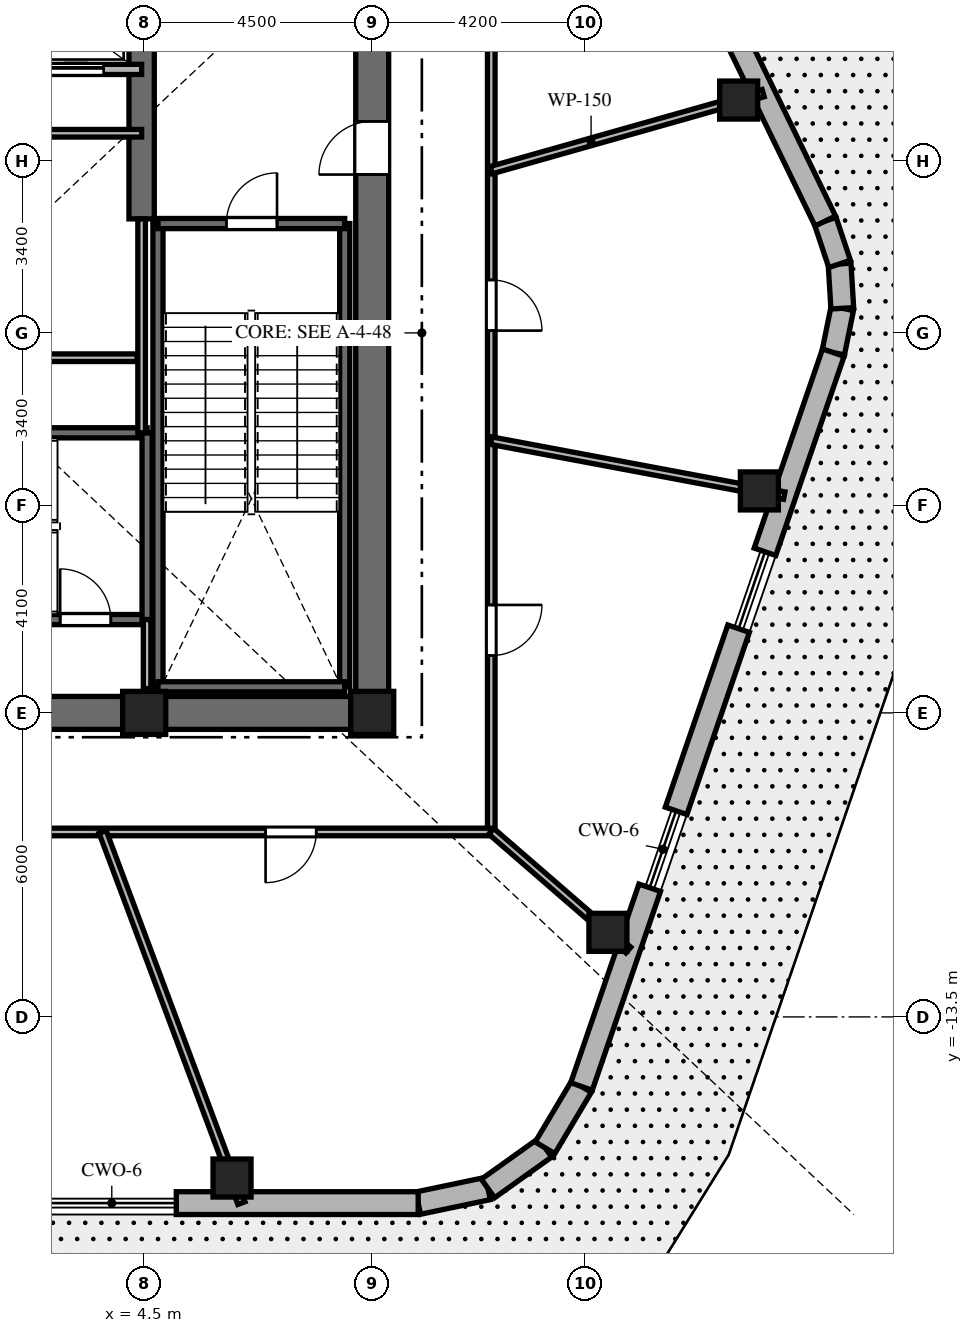
"""IFC4 building model, lengths in metres.
Left out: names, types, materials, properties, quantities, classifications, styles, units other than length and angle.
Written with IfcOpenShell. Run it as: python <this file> out.ifc"""

import sys

from ifc_helpers import new_model, si_unit, direction, frame, frame_2d, origin, origin_2d, place, context, subcontext, project, spatial, rectangle, extrude, element, fill, save


model = new_model("IFC4")
c1 = context("Model", 3, precision=1e-05, world=origin(), true_north=direction((0.0, 1.0)))
c2 = subcontext(c1, "Body", "Model", "MODEL_VIEW")
j1 = project(units=[si_unit("LENGTHUNIT", "METRE"), si_unit("PLANEANGLEUNIT", "RADIAN")], contexts=[c1])
p1 = place(None, origin())
s1 = spatial("IfcSite", under=j1, at=p1, CompositionType="ELEMENT")
p2 = place(p1, origin())
s2 = spatial("IfcBuilding", under=s1, at=p2, CompositionType="ELEMENT")
p3 = place(p2, frame((0.0, 0.0, 305.4)))
s3 = spatial("IfcBuildingStorey", under=s2, at=p3, CompositionType="ELEMENT", Elevation=305.4)
p4 = place(p3, frame((-9.325, -7.5, 0.0), z_axis=(0.0, 0.0, 1.0), x_axis=(1.0, 0.0, 0.0)))
e1 = element("IfcWall", 1, at=p4, inside=s3, PredefinedType="SHEAR", context=c2, shape_type="SweptSolid", body=[
    extrude(rectangle(XDim=18.65, YDim=0.65, at=frame_2d((9.325, 0.0))), origin(), (0.0, 0.0, 1.0), 5.0),
])
p5 = place(p4, frame((9.375, 0.0, 0.0)))
e2 = element("IfcOpeningElement", 2, at=p5, cuts=e1, PredefinedType="OPENING", context=c2, shape_type="SweptSolid", body=[
    extrude(rectangle(XDim=1.0, YDim=2.15, at=frame_2d((0.5, 1.075))), frame((0.0, 0.335, 0.0), z_axis=(0.0, -1.0, 0.0), x_axis=(1.0, 0.0, 0.0)), (0.0, 0.0, 1.0), 0.67),
])
p6 = place(p3, frame((9.0, -7.175, 0.0), z_axis=(0.0, 0.0, 1.0), x_axis=(0.0, 1.0, 0.0)))
e3 = element("IfcWall", 3, at=p6, inside=s3, PredefinedType="SHEAR", context=c2, shape_type="SweptSolid", body=[
    extrude(rectangle(XDim=14.35, YDim=0.65, at=frame_2d((7.175, 0.0))), origin(), (0.0, 0.0, 1.0), 5.0),
])
p7 = place(p6, frame((10.3, 0.0, 0.0)))
e4 = element("IfcOpeningElement", 4, at=p7, cuts=e3, PredefinedType="OPENING", context=c2, shape_type="SweptSolid", body=[
    extrude(rectangle(XDim=1.05, YDim=2.15, at=frame_2d((0.525, 1.075))), frame((0.0, 0.335, 0.0), z_axis=(0.0, -1.0, 0.0), x_axis=(1.0, 0.0, 0.0)), (0.0, 0.0, 1.0), 0.67),
])
p8 = place(p3, frame((4.45, 2.25, 0.0), z_axis=(0.0, 0.0, 1.0), x_axis=(0.0, 1.0, 0.0)))
e5 = element("IfcWall", 5, at=p8, inside=s3, PredefinedType="SHEAR", context=c2, shape_type="SweptSolid", body=[
    extrude(rectangle(XDim=4.925, YDim=0.5, at=frame_2d((2.462, 0.0))), origin(), (0.0, 0.0, 1.0), 5.0),
])
for number, where, z_axis, x_axis in (
    (6, (4.772, -6.985, 0.0), (0.0, 0.0, 1.0), (0.0, 1.0, 0.0)),
    (7, (8.458, -6.985, 0.0), (0.0, 0.0, 1.0), (0.0, 1.0, 0.0)),
):
    element("IfcWall", number, at=place(p3, frame(where, z_axis=z_axis, x_axis=x_axis)), inside=s3, PredefinedType="SHEAR", context=c2, shape_type="SweptSolid", body=[
        extrude(rectangle(XDim=9.143, YDim=0.2, at=frame_2d((4.572, 0.0))), origin(), (0.0, 0.0, 1.0), 5.0),
    ])
p9 = place(p3, frame((4.772, -6.985, 0.0), z_axis=(0.0, 0.0, 1.0), x_axis=(1.0, 0.0, 0.0)))
e8 = element("IfcWall", 8, at=p9, inside=s3, PredefinedType="SHEAR", context=c2, shape_type="SweptSolid", body=[
    extrude(rectangle(XDim=3.686, YDim=0.2, at=frame_2d((1.843, 0.0))), origin(), (0.0, 0.0, 1.0), 5.0),
])
p10 = place(p3, frame((4.772, 2.158, 0.0), z_axis=(0.0, 0.0, 1.0), x_axis=(1.0, 0.0, 0.0)))
e9 = element("IfcWall", 9, at=p10, inside=s3, PredefinedType="SHEAR", context=c2, shape_type="SweptSolid", body=[
    extrude(rectangle(XDim=3.686, YDim=0.2, at=frame_2d((1.843, 0.0))), origin(), (0.0, 0.0, 1.0), 5.0),
])
p11 = place(p10, frame((1.35, 0.0, 0.0)))
e10 = element("IfcOpeningElement", 10, at=p11, cuts=e9, PredefinedType="OPENING", context=c2, shape_type="SweptSolid", body=[
    extrude(rectangle(XDim=1.0, YDim=2.15, at=frame_2d((0.5, 1.075))), frame((0.0, 0.11, 0.0), z_axis=(0.0, -1.0, 0.0), x_axis=(1.0, 0.0, 0.0)), (0.0, 0.0, 1.0), 0.22),
])
p12 = place(p3, frame((-4.608, -5.658, 0.0), z_axis=(0.0, 0.0, 1.0), x_axis=(1.0, 0.0, 0.0)))
e11 = element("IfcWall", 11, at=p12, inside=s3, PredefinedType="SHEAR", context=c2, shape_type="SweptSolid", body=[
    extrude(rectangle(XDim=9.166, YDim=0.2, at=frame_2d((4.583, 0.0))), origin(), (0.0, 0.0, 1.0), 5.0),
])
p13 = place(p12, frame((7.45, 0.0, 0.0)))
e12 = element("IfcOpeningElement", 12, at=p13, cuts=e11, PredefinedType="OPENING", context=c2, shape_type="SweptSolid", body=[
    extrude(rectangle(XDim=1.0, YDim=2.15, at=frame_2d((0.5, 1.075))), frame((0.0, 0.11, 0.0), z_axis=(0.0, -1.0, 0.0), x_axis=(1.0, 0.0, 0.0)), (0.0, 0.0, 1.0), 0.22),
])
p14 = place(p3, frame((-4.608, -1.972, 0.0), z_axis=(0.0, 0.0, 1.0), x_axis=(1.0, 0.0, 0.0)))
e13 = element("IfcWall", 13, at=p14, inside=s3, PredefinedType="SHEAR", context=c2, shape_type="SweptSolid", body=[
    extrude(rectangle(XDim=9.166, YDim=0.2, at=frame_2d((4.583, 0.0))), origin(), (0.0, 0.0, 1.0), 5.0),
])
p15 = place(p3, frame((4.558, -5.658, 0.0), z_axis=(0.0, 0.0, 1.0), x_axis=(0.0, 1.0, 0.0)))
e14 = element("IfcWall", 14, at=p15, inside=s3, PredefinedType="SHEAR", context=c2, shape_type="SweptSolid", body=[
    extrude(rectangle(XDim=3.686, YDim=0.2, at=frame_2d((1.843, 0.0))), origin(), (0.0, 0.0, 1.0), 5.0),
])
for number, where, z_axis, x_axis in (
    (15, (4.5, -7.5, 0.0), (0.0, 0.0, 1.0), (1.0, 0.0, 0.0)),
    (16, (9.0, -7.5, 0.0), (0.0, 0.0, 1.0), (1.0, 0.0, 0.0)),
):
    element("IfcColumn", number, at=place(p3, frame(where, z_axis=z_axis, x_axis=x_axis)), inside=s3, PredefinedType="COLUMN", context=c2, shape_type="SweptSolid", body=[
        extrude(rectangle(XDim=0.85, YDim=0.85, at=origin_2d()), origin(), (0.0, 0.0, 1.0), 5.0),
    ])
for number, where, z_axis, x_axis in (
    (17, (6.234, -16.68, 0.0), (0.0, 0.0, 1.0), (1.0, 0.0, 0.0)),
    (18, (13.652, -11.831, 0.0), (0.0, 0.0, 1.0), (1.0, 0.0, 0.0)),
    (19, (16.641, -3.119, 0.0), (0.0, 0.0, 1.0), (1.0, 0.0, 0.0)),
    (20, (16.232, 4.595, 0.0), (0.0, 0.0, 1.0), (1.0, 0.0, 0.0)),
):
    element("IfcColumn", number, at=place(p3, frame(where, z_axis=z_axis, x_axis=x_axis)), inside=s3, PredefinedType="COLUMN", context=c2, shape_type="SweptSolid", body=[
        extrude(rectangle(XDim=0.75, YDim=0.75, at=origin_2d()), origin(), (0.0, 0.0, 1.0), 5.0),
    ])
p16 = place(p3, frame((9.908, -17.175, 0.0), z_axis=(0.0, 0.0, 1.0), x_axis=(0.978709642506, 0.205249691027, 0.0)))
e21 = element("IfcWall", 21, at=p16, inside=s3, PredefinedType="SOLIDWALL", context=c2, shape_type="SweptSolid", body=[
    extrude(rectangle(XDim=1.407, YDim=0.45, at=frame_2d((0.704, 0.0))), origin(), (0.0, 0.0, 1.0), 4.68),
])
p17 = place(p3, frame((11.285, -16.886, 0.0), z_axis=(0.0, 0.0, 1.0), x_axis=(0.813840765051, 0.581087953017, 0.0)))
e22 = element("IfcWall", 22, at=p17, inside=s3, PredefinedType="SOLIDWALL", context=c2, shape_type="SweptSolid", body=[
    extrude(rectangle(XDim=1.384, YDim=0.45, at=frame_2d((0.692, 0.0))), origin(), (0.0, 0.0, 1.0), 4.68),
])
p18 = place(p3, frame((12.411, -16.082, 0.0), z_axis=(0.0, 0.0, 1.0), x_axis=(0.511788829014, 0.859111281789, 0.0)))
e23 = element("IfcWall", 23, at=p18, inside=s3, PredefinedType="SOLIDWALL", context=c2, shape_type="SweptSolid", body=[
    extrude(rectangle(XDim=1.407, YDim=0.45, at=frame_2d((0.704, 0.0))), origin(), (0.0, 0.0, 1.0), 4.68),
])
p19 = place(p3, frame((18.1, -0.389, 0.0), z_axis=(0.0, 0.0, 1.0), x_axis=(0.198587865476, 0.980083088154, 0.0)))
e24 = element("IfcWall", 24, at=p19, inside=s3, PredefinedType="SOLIDWALL", context=c2, shape_type="SweptSolid", body=[
    extrude(rectangle(XDim=0.893, YDim=0.45, at=frame_2d((0.446, 0.0))), origin(), (0.0, 0.0, 1.0), 4.68),
])
p20 = place(p3, frame((18.278, 0.486, 0.0), z_axis=(0.0, 0.0, 1.0), x_axis=(-0.060923410031, 0.998142443798, 0.0)))
e25 = element("IfcWall", 25, at=p20, inside=s3, PredefinedType="SOLIDWALL", context=c2, shape_type="SweptSolid", body=[
    extrude(rectangle(XDim=0.878, YDim=0.45, at=frame_2d((0.439, 0.0))), origin(), (0.0, 0.0, 1.0), 4.68),
])
p21 = place(p3, frame((18.224, 1.362, 0.0), z_axis=(0.0, 0.0, 1.0), x_axis=(-0.316227766017, 0.948683298051, 0.0)))
e26 = element("IfcWall", 26, at=p21, inside=s3, PredefinedType="SOLIDWALL", context=c2, shape_type="SweptSolid", body=[
    extrude(rectangle(XDim=0.893, YDim=0.45, at=frame_2d((0.446, 0.0))), origin(), (0.0, 0.0, 1.0), 4.68),
])
p22 = place(p3, frame((5.134, -17.175, 0.0), z_axis=(0.0, 0.0, 1.0), x_axis=(1.0, 0.0, 0.0)))
e27 = element("IfcWall", 27, at=p22, inside=s3, PredefinedType="SOLIDWALL", context=c2, shape_type="SweptSolid", body=[
    extrude(rectangle(XDim=4.773, YDim=0.45, at=frame_2d((2.387, 0.0))), origin(), (0.0, 0.0, 1.0), 4.68),
])
p23 = place(p3, frame((13.131, -14.873, 0.0), z_axis=(0.0, 0.0, 1.0), x_axis=(0.324498911717, 0.945886069405, 0.0)))
e28 = element("IfcWall", 28, at=p23, inside=s3, PredefinedType="SOLIDWALL", context=c2, shape_type="SweptSolid", body=[
    extrude(rectangle(XDim=4.147, YDim=0.45, at=frame_2d((2.073, 0.0))), origin(), (0.0, 0.0, 1.0), 4.68),
])
p24 = place(p3, frame((14.998, -9.433, 0.0), z_axis=(0.0, 0.0, 1.0), x_axis=(0.324503351443, 0.945884546286, 0.0)))
e29 = element("IfcWall", 29, at=p24, inside=s3, PredefinedType="SOLIDWALL", context=c2, shape_type="SweptSolid", body=[
    extrude(rectangle(XDim=3.8, YDim=0.45, at=frame_2d((1.9, 0.0))), origin(), (0.0, 0.0, 1.0), 4.68),
])
p25 = place(p3, frame((16.752, -4.32, 0.0), z_axis=(0.0, 0.0, 1.0), x_axis=(0.324516563827, 0.945880013428, 0.0)))
e30 = element("IfcWall", 30, at=p25, inside=s3, PredefinedType="SOLIDWALL", context=c2, shape_type="SweptSolid", body=[
    extrude(rectangle(XDim=4.156, YDim=0.45, at=frame_2d((2.078, 0.0))), origin(), (0.0, 0.0, 1.0), 4.68),
])
p26 = place(p3, frame((17.942, 2.208, 0.0), z_axis=(0.0, 0.0, 1.0), x_axis=(-0.437062225544, 0.899431270861, 0.0)))
e31 = element("IfcWall", 31, at=p26, inside=s3, PredefinedType="SOLIDWALL", context=c2, shape_type="SweptSolid", body=[
    extrude(rectangle(XDim=3.994, YDim=0.45, at=frame_2d((1.997, 0.0))), origin(), (0.0, 0.0, 1.0), 4.68),
])
p27 = place(p3, frame((4.558, -7.02, 0.0), z_axis=(0.0, 0.0, 1.0), x_axis=(0.0, 1.0, 0.0)))
e32 = element("IfcWall", 32, at=p27, inside=s3, PredefinedType="PARTITIONING", context=c2, shape_type="SweptSolid", body=[
    extrude(rectangle(XDim=1.362, YDim=0.15, at=frame_2d((0.681, 0.0))), origin(), (0.0, 0.0, 1.0), 4.68),
])
p28 = place(p3, frame((1.85, 5.2, 0.0), z_axis=(0.0, 0.0, 1.0), x_axis=(1.0, 0.0, 0.0)))
e33 = element("IfcWall", 33, at=p28, inside=s3, PredefinedType="PARTITIONING", context=c2, shape_type="SweptSolid", body=[
    extrude(rectangle(XDim=2.6, YDim=0.2, at=frame_2d((1.3, 0.0))), origin(), (0.0, 0.0, 1.0), 4.68),
])
p29 = place(p28, frame((0.75, 0.0, 0.0)))
e34 = element("IfcOpeningElement", 34, at=p29, cuts=e33, PredefinedType="OPENING", context=c2, shape_type="SweptSolid", body=[
    extrude(rectangle(XDim=1.1, YDim=2.2, at=frame_2d((0.55, 1.1))), frame((0.0, 0.11, 0.0), z_axis=(0.0, -1.0, 0.0), x_axis=(1.0, 0.0, 0.0)), (0.0, 0.0, 1.0), 0.22),
])
p30 = place(p3, frame((4.45, -1.972, 0.0), z_axis=(0.0, 0.0, 1.0), x_axis=(0.0, 1.0, 0.0)))
e35 = element("IfcWall", 35, at=p30, inside=s3, PredefinedType="PARTITIONING", context=c2, shape_type="SweptSolid", body=[
    extrude(rectangle(XDim=4.222, YDim=0.15, at=frame_2d((2.111, 0.0))), origin(), (0.0, 0.0, 1.0), 4.68),
])
p31 = place(p3, frame((1.9, 3.94, 0.0), z_axis=(0.0, 0.0, 1.0), x_axis=(1.0, 0.0, 0.0)))
e36 = element("IfcWall", 36, at=p31, inside=s3, PredefinedType="PARTITIONING", context=c2, shape_type="SweptSolid", body=[
    extrude(rectangle(XDim=2.55, YDim=0.15, at=frame_2d((1.275, 0.0))), origin(), (0.0, 0.0, 1.0), 4.68),
])
p32 = place(p3, frame((-4.36, -0.49, 0.0), z_axis=(0.0, 0.0, 1.0), x_axis=(1.0, 0.0, 0.0)))
e37 = element("IfcWall", 37, at=p32, inside=s3, PredefinedType="PARTITIONING", context=c2, shape_type="SweptSolid", body=[
    extrude(rectangle(XDim=8.72, YDim=0.15, at=frame_2d((4.36, 0.0))), origin(), (0.0, 0.0, 1.0), 4.68),
])
p33 = place(p32, frame((2.81, 0.0, 0.0)))
e38 = element("IfcOpeningElement", 38, at=p33, cuts=e37, PredefinedType="OPENING", context=c2, shape_type="SweptSolid", body=[
    extrude(rectangle(XDim=0.85, YDim=2.03, at=frame_2d((0.425, 1.015))), frame((0.0, 0.085, 0.0), z_axis=(0.0, -1.0, 0.0), x_axis=(1.0, 0.0, 0.0)), (0.0, 0.0, 1.0), 0.17),
])
p34 = place(p32, frame((4.61, 0.0, 0.0)))
e39 = element("IfcOpeningElement", 39, at=p34, cuts=e37, PredefinedType="OPENING", context=c2, shape_type="SweptSolid", body=[
    extrude(rectangle(XDim=0.85, YDim=2.03, at=frame_2d((0.425, 1.015))), frame((0.0, 0.085, 0.0), z_axis=(0.0, -1.0, 0.0), x_axis=(1.0, 0.0, 0.0)), (0.0, 0.0, 1.0), 0.17),
])
p35 = place(p3, frame((11.35, 9.85, 0.0), z_axis=(0.0, 0.0, 1.0), x_axis=(0.0, -1.0, 0.0)))
e40 = element("IfcWall", 40, at=p35, inside=s3, PredefinedType="PARTITIONING", context=c2, shape_type="SweptSolid", body=[
    extrude(rectangle(XDim=19.7, YDim=0.15, at=frame_2d((9.85, 0.0))), origin(), (0.0, 0.0, 1.0), 2.87),
])
p36 = place(p35, frame((2.938, 0.0, 0.0)))
e41 = element("IfcOpeningElement", 41, at=p36, cuts=e40, PredefinedType="OPENING", context=c2, shape_type="SweptSolid", body=[
    extrude(rectangle(XDim=1.0, YDim=2.03, at=frame_2d((0.5, 1.015))), frame((0.0, 0.085, 0.0), z_axis=(0.0, -1.0, 0.0), x_axis=(1.0, 0.0, 0.0)), (0.0, 0.0, 1.0), 0.17),
])
p37 = place(p35, frame((15.219, 0.0, 0.0)))
e42 = element("IfcOpeningElement", 42, at=p37, cuts=e40, PredefinedType="OPENING", context=c2, shape_type="SweptSolid", body=[
    extrude(rectangle(XDim=1.0, YDim=2.03, at=frame_2d((0.5, 1.015))), frame((0.0, 0.085, 0.0), z_axis=(0.0, -1.0, 0.0), x_axis=(1.0, 0.0, 0.0)), (0.0, 0.0, 1.0), 0.17),
])
p38 = place(p35, frame((8.805, 0.0, 0.0)))
e43 = element("IfcOpeningElement", 43, at=p38, cuts=e40, PredefinedType="OPENING", context=c2, shape_type="SweptSolid", body=[
    extrude(rectangle(XDim=1.0, YDim=2.03, at=frame_2d((0.5, 1.015))), frame((0.0, 0.085, 0.0), z_axis=(0.0, -1.0, 0.0), x_axis=(1.0, 0.0, 0.0)), (0.0, 0.0, 1.0), 0.17),
])
p39 = place(p3, frame((11.35, -9.85, 0.0), z_axis=(0.0, 0.0, 1.0), x_axis=(-1.0, 0.0, 0.0)))
e44 = element("IfcWall", 44, at=p39, inside=s3, PredefinedType="PARTITIONING", context=c2, shape_type="SweptSolid", body=[
    extrude(rectangle(XDim=22.7, YDim=0.15, at=frame_2d((11.35, 0.0))), origin(), (0.0, 0.0, 1.0), 2.87),
])
p40 = place(p39, frame((17.249, 0.0, 0.0)))
e45 = element("IfcOpeningElement", 45, at=p40, cuts=e44, PredefinedType="OPENING", context=c2, shape_type="SweptSolid", body=[
    extrude(rectangle(XDim=1.0, YDim=2.03, at=frame_2d((0.5, 1.015))), frame((0.0, 0.085, 0.0), z_axis=(0.0, -1.0, 0.0), x_axis=(1.0, 0.0, 0.0)), (0.0, 0.0, 1.0), 0.17),
])
p41 = place(p39, frame((10.441, 0.0, 0.0)))
e46 = element("IfcOpeningElement", 46, at=p41, cuts=e44, PredefinedType="OPENING", context=c2, shape_type="SweptSolid", body=[
    extrude(rectangle(XDim=1.0, YDim=2.03, at=frame_2d((0.5, 1.015))), frame((0.0, 0.085, 0.0), z_axis=(0.0, -1.0, 0.0), x_axis=(1.0, 0.0, 0.0)), (0.0, 0.0, 1.0), 0.17),
])
p42 = place(p39, frame((3.454, 0.0, 0.0)))
e47 = element("IfcOpeningElement", 47, at=p42, cuts=e44, PredefinedType="OPENING", context=c2, shape_type="SweptSolid", body=[
    extrude(rectangle(XDim=1.0, YDim=2.03, at=frame_2d((0.5, 1.015))), frame((0.0, 0.085, 0.0), z_axis=(0.0, -1.0, 0.0), x_axis=(1.0, 0.0, 0.0)), (0.0, 0.0, 1.0), 0.17),
])
p43 = place(p3, frame((11.35, 3.213, 0.0), z_axis=(0.0, 0.0, 1.0), x_axis=(0.962182015747, 0.272407357782, 0.0)))
e48 = element("IfcWall", 48, at=p43, inside=s3, PredefinedType="PARTITIONING", context=c2, shape_type="SweptSolid", body=[
    extrude(rectangle(XDim=5.576, YDim=0.15, at=frame_2d((2.788, 0.0))), origin(), (0.0, 0.0, 1.0), 2.87),
])
p44 = place(p3, frame((3.681, -9.85, 0.0), z_axis=(0.0, 0.0, 1.0), x_axis=(0.350079676448, -0.936719926199, 0.0)))
e49 = element("IfcWall", 49, at=p44, inside=s3, PredefinedType="PARTITIONING", context=c2, shape_type="SweptSolid", body=[
    extrude(rectangle(XDim=7.82, YDim=0.15, at=frame_2d((3.91, 0.0))), origin(), (0.0, 0.0, 1.0), 2.87),
])
p45 = place(p3, frame((11.35, -9.836, 0.0), z_axis=(0.0, 0.0, 1.0), x_axis=(0.755716089778, -0.65489937521, 0.0)))
e50 = element("IfcWall", 50, at=p45, inside=s3, PredefinedType="PARTITIONING", context=c2, shape_type="SweptSolid", body=[
    extrude(rectangle(XDim=3.579, YDim=0.15, at=frame_2d((1.79, 0.0))), origin(), (0.0, 0.0, 1.0), 2.87),
])
p46 = place(p3, frame((11.35, -2.127, 0.0), z_axis=(0.0, 0.0, 1.0), x_axis=(0.982876415115, -0.184265983326, 0.0)))
e51 = element("IfcWall", 51, at=p46, inside=s3, PredefinedType="PARTITIONING", context=c2, shape_type="SweptSolid", body=[
    extrude(rectangle(XDim=5.883, YDim=0.15, at=frame_2d((2.941, 0.0))), origin(), (0.0, 0.0, 1.0), 2.87),
])
p47 = place(p11, origin())
e52 = element("IfcDoor", 52, at=p47, inside=s3, OperationType="SINGLE_SWING_RIGHT", PredefinedType="DOOR", context=c2, shape_type="SweptSolid", body=[
    extrude(rectangle(XDim=1.0, YDim=2.15, at=frame_2d((0.5, 1.075))), frame((0.0, 0.025, 0.0), z_axis=(0.0, -1.0, 0.0), x_axis=(1.0, 0.0, 0.0)), (0.0, 0.0, 1.0), 0.05),
])
fill(e10, e52)
p48 = place(p13, origin())
e53 = element("IfcDoor", 53, at=p48, inside=s3, OperationType="SINGLE_SWING_LEFT", PredefinedType="DOOR", context=c2, shape_type="SweptSolid", body=[
    extrude(rectangle(XDim=1.0, YDim=2.15, at=frame_2d((0.5, 1.075))), frame((0.0, 0.025, 0.0), z_axis=(0.0, -1.0, 0.0), x_axis=(1.0, 0.0, 0.0)), (0.0, 0.0, 1.0), 0.05),
])
fill(e12, e53)
p49 = place(p7, origin())
e54 = element("IfcDoor", 54, at=p49, inside=s3, OperationType="SINGLE_SWING_LEFT", PredefinedType="DOOR", context=c2, shape_type="SweptSolid", body=[
    extrude(rectangle(XDim=1.05, YDim=2.15, at=frame_2d((0.525, 1.075))), frame((0.0, 0.025, 0.0), z_axis=(0.0, -1.0, 0.0), x_axis=(1.0, 0.0, 0.0)), (0.0, 0.0, 1.0), 0.05),
])
fill(e4, e54)
p50 = place(p29, origin())
e55 = element("IfcDoor", 55, at=p50, inside=s3, OperationType="SLIDING_TO_RIGHT", PredefinedType="DOOR", context=c2, shape_type="SweptSolid", body=[
    extrude(rectangle(XDim=1.1, YDim=2.2, at=frame_2d((0.55, 1.1))), frame((0.0, 0.025, 0.0), z_axis=(0.0, -1.0, 0.0), x_axis=(1.0, 0.0, 0.0)), (0.0, 0.0, 1.0), 0.05),
])
fill(e34, e55)
p51 = place(p42, origin())
e56 = element("IfcDoor", 56, at=p51, inside=s3, OperationType="SINGLE_SWING_RIGHT", PredefinedType="DOOR", context=c2, shape_type="SweptSolid", body=[
    extrude(rectangle(XDim=1.0, YDim=2.03, at=frame_2d((0.5, 1.015))), frame((0.0, 0.025, 0.0), z_axis=(0.0, -1.0, 0.0), x_axis=(1.0, 0.0, 0.0)), (0.0, 0.0, 1.0), 0.05),
])
fill(e47, e56)
p52 = place(p37, origin())
e57 = element("IfcDoor", 57, at=p52, inside=s3, OperationType="SINGLE_SWING_LEFT", PredefinedType="DOOR", context=c2, shape_type="SweptSolid", body=[
    extrude(rectangle(XDim=1.0, YDim=2.03, at=frame_2d((0.5, 1.015))), frame((0.0, 0.025, 0.0), z_axis=(0.0, -1.0, 0.0), x_axis=(1.0, 0.0, 0.0)), (0.0, 0.0, 1.0), 0.05),
])
fill(e42, e57)
p53 = place(p38, origin())
e58 = element("IfcDoor", 58, at=p53, inside=s3, OperationType="SINGLE_SWING_RIGHT", PredefinedType="DOOR", context=c2, shape_type="SweptSolid", body=[
    extrude(rectangle(XDim=1.0, YDim=2.03, at=frame_2d((0.5, 1.015))), frame((0.0, 0.025, 0.0), z_axis=(0.0, -1.0, 0.0), x_axis=(1.0, 0.0, 0.0)), (0.0, 0.0, 1.0), 0.05),
])
fill(e43, e58)
save(model, sys.argv[1])
